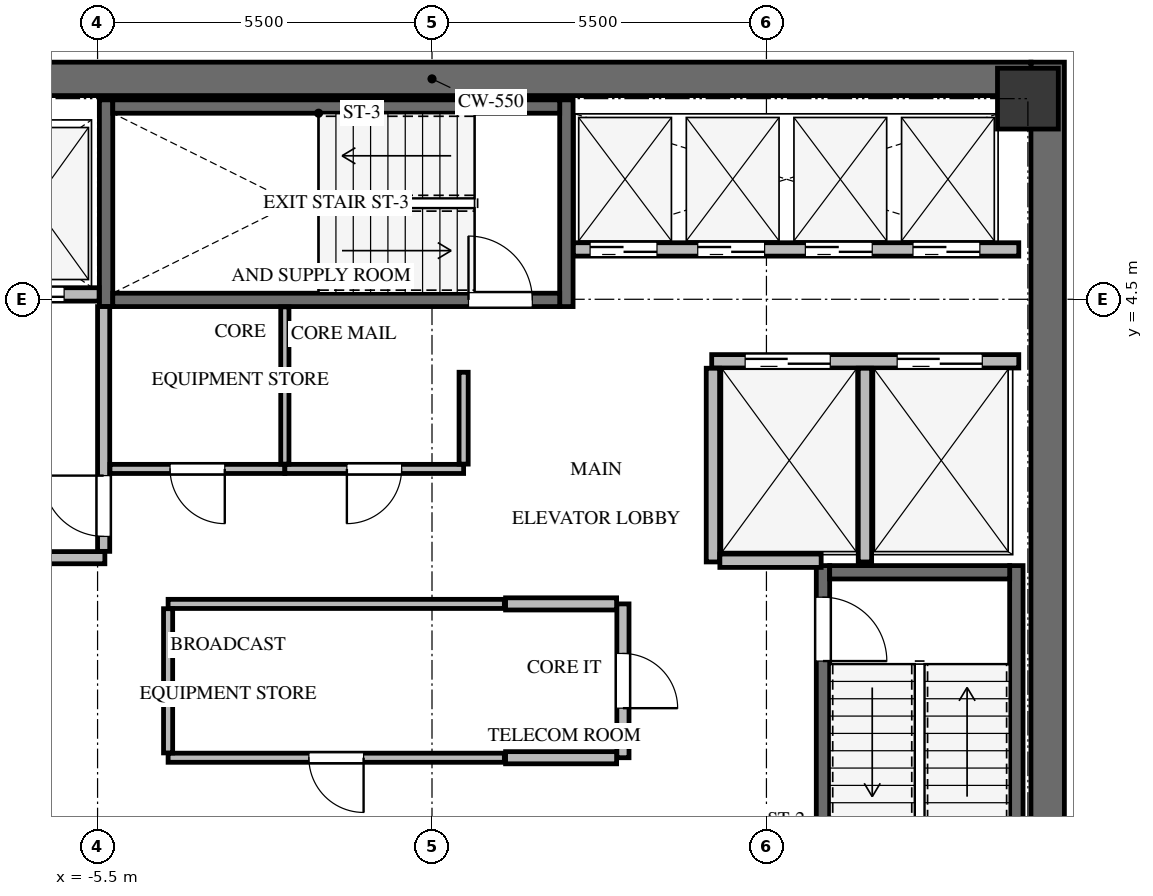
"""IFC4 building model, lengths in metres.
Left out: names, types, materials, properties, quantities, classifications, styles, units other than length and angle.
Written with IfcOpenShell. Run it as: python <this file> out.ifc"""

import sys

from ifc_helpers import new_model, si_unit, direction, frame, frame_2d, origin, origin_2d, place, context, subcontext, project, spatial, rectangle, extrude, source, transform, mapped, element, fill, save


model = new_model("IFC4")
c1 = context("Model", 3, precision=1e-05, world=origin(), true_north=direction((0.0, 1.0)))
c2 = subcontext(c1, "Body", "Model", "MODEL_VIEW")
j1 = project(units=[si_unit("LENGTHUNIT", "METRE"), si_unit("PLANEANGLEUNIT", "RADIAN")], contexts=[c1])
p1 = place(None, origin())
s1 = spatial("IfcSite", under=j1, at=p1, CompositionType="ELEMENT")
p2 = place(p1, origin())
s2 = spatial("IfcBuilding", under=s1, at=p2, CompositionType="ELEMENT")
p3 = place(p2, frame((0.0, 0.0, 228.2)))
s3 = spatial("IfcBuildingStorey", under=s2, at=p3, CompositionType="ELEMENT", Elevation=228.2)
p4 = place(p3, frame((10.125, -8.4, 0.0), z_axis=(0.0, 0.0, 1.0), x_axis=(0.0, 1.0, 0.0)))
e1 = element("IfcWall", 1, at=p4, inside=s3, PredefinedType="SHEAR", context=c2, shape_type="SweptSolid", body=[
    extrude(rectangle(XDim=16.8, YDim=0.55, at=frame_2d((8.4, 0.0))), origin(), (0.0, 0.0, 1.0), 3.3),
])
p5 = place(p3, frame((-9.85, 8.125, 0.0), z_axis=(0.0, 0.0, 1.0), x_axis=(1.0, 0.0, 0.0)))
e2 = element("IfcWall", 2, at=p5, inside=s3, PredefinedType="SHEAR", context=c2, shape_type="SweptSolid", body=[
    extrude(rectangle(XDim=19.7, YDim=0.55, at=frame_2d((9.85, 0.0))), origin(), (0.0, 0.0, 1.0), 3.3),
])
p6 = place(p3, frame((9.61, -7.77, -0.24), z_axis=(0.0, 0.0, 1.0), x_axis=(0.0, 1.0, 0.0)))
e3 = element("IfcWall", 3, at=p6, inside=s3, PredefinedType="SHEAR", context=c2, shape_type="SweptSolid", body=[
    extrude(rectangle(XDim=7.89, YDim=0.22, at=frame_2d((3.945, 0.0))), origin(), (0.0, 0.0, 1.0), 3.3),
])
p7 = place(p3, frame((6.43, 0.12, -0.24), z_axis=(0.0, 0.0, 1.0), x_axis=(0.0, -1.0, 0.0)))
e4 = element("IfcWall", 4, at=p7, inside=s3, PredefinedType="SHEAR", context=c2, shape_type="SweptSolid", body=[
    extrude(rectangle(XDim=7.89, YDim=0.22, at=frame_2d((3.945, 0.0))), origin(), (0.0, 0.0, 1.0), 3.3),
])
p8 = place(p7, frame((0.52, 0.0, 0.0)))
e5 = element("IfcOpeningElement", 5, at=p8, cuts=e4, PredefinedType="OPENING", context=c2, shape_type="SweptSolid", body=[
    extrude(rectangle(XDim=1.05, YDim=2.15, at=frame_2d((0.525, 1.075))), frame((0.0, 0.12, 0.0), z_axis=(0.0, -1.0, 0.0), x_axis=(1.0, 0.0, 0.0)), (0.0, 0.0, 1.0), 0.24),
])
p9 = place(p3, frame((9.5, 0.01, -0.24), z_axis=(0.0, 0.0, 1.0), x_axis=(-1.0, 0.0, 0.0)))
e6 = element("IfcWall", 6, at=p9, inside=s3, PredefinedType="SHEAR", context=c2, shape_type="SweptSolid", body=[
    extrude(rectangle(XDim=2.96, YDim=0.22, at=frame_2d((1.48, 0.0))), origin(), (0.0, 0.0, 1.0), 3.3),
])
for number, where, z_axis, x_axis in (
    (7, (2.21, 4.38, -0.24), (0.0, 0.0, 1.0), (0.0, 1.0, 0.0)),
    (8, (-5.36, 7.78, -0.24), (0.0, 0.0, 1.0), (0.0, -1.0, 0.0)),
):
    element("IfcWall", number, at=place(p3, frame(where, z_axis=z_axis, x_axis=x_axis)), inside=s3, PredefinedType="SHEAR", context=c2, shape_type="SweptSolid", body=[
        extrude(rectangle(XDim=3.4, YDim=0.22, at=frame_2d((1.7, 0.0))), origin(), (0.0, 0.0, 1.0), 3.3),
    ])
p10 = place(p3, frame((-5.25, 4.49, -0.24), z_axis=(0.0, 0.0, 1.0), x_axis=(1.0, 0.0, 0.0)))
e9 = element("IfcWall", 9, at=p10, inside=s3, PredefinedType="SHEAR", context=c2, shape_type="SweptSolid", body=[
    extrude(rectangle(XDim=7.35, YDim=0.22, at=frame_2d((3.675, 0.0))), origin(), (0.0, 0.0, 1.0), 3.3),
])
p11 = place(p10, frame((5.85, 0.0, 0.0)))
e10 = element("IfcOpeningElement", 10, at=p11, cuts=e9, PredefinedType="OPENING", context=c2, shape_type="SweptSolid", body=[
    extrude(rectangle(XDim=1.05, YDim=2.15, at=frame_2d((0.525, 1.075))), frame((0.0, 0.12, 0.0), z_axis=(0.0, -1.0, 0.0), x_axis=(1.0, 0.0, 0.0)), (0.0, 0.0, 1.0), 0.24),
])
p12 = place(p3, frame((2.1, 7.67, -0.24), z_axis=(0.0, 0.0, 1.0), x_axis=(-1.0, 0.0, 0.0)))
e11 = element("IfcWall", 11, at=p12, inside=s3, PredefinedType="SHEAR", context=c2, shape_type="SweptSolid", body=[
    extrude(rectangle(XDim=7.35, YDim=0.22, at=frame_2d((3.675, 0.0))), origin(), (0.0, 0.0, 1.0), 3.3),
])
m1 = source(origin(), c2, "Body", "SweptSolid", [
    extrude(rectangle(XDim=1.0, YDim=1.0, at=origin_2d()), origin(), (0.0, 0.0, 1.0), 3.3),
])
p13 = place(p3, frame((9.8, 7.8, -0.24), z_axis=(0.0, 0.0, 1.0), x_axis=(1.0, 0.0, 0.0)))
e12 = element("IfcColumn", 12, at=p13, inside=s3, PredefinedType="COLUMN", context=c2, shape_type="MappedRepresentation", body=[
    mapped(m1, transform((0.0, 0.0, 0.0), x_axis=(1.0, 0.0, 0.0), y_axis=(0.0, 1.0, 0.0), z_axis=(0.0, 0.0, 1.0), scale=1.0)),
])
p14 = place(p3, frame((-9.65, 4.58, 0.0), z_axis=(0.0, 0.0, 1.0), x_axis=(1.0, 0.0, 0.0)))
e13 = element("IfcWall", 13, at=p14, inside=s3, PredefinedType="SOLIDWALL", context=c2, shape_type="SweptSolid", body=[
    extrude(rectangle(XDim=4.175, YDim=0.22, at=frame_2d((2.087, 0.0))), origin(), (0.0, 0.0, 1.0), 3.045),
])
p15 = place(p14, frame((0.4, 0.0, 0.0)))
e14 = element("IfcOpeningElement", 14, at=p15, cuts=e13, PredefinedType="OPENING", context=c2, shape_type="SweptSolid", body=[
    extrude(rectangle(XDim=1.2, YDim=2.15, at=frame_2d((0.6, 1.075))), frame((0.0, 0.12, 0.0), z_axis=(0.0, -1.0, 0.0), x_axis=(1.0, 0.0, 0.0)), (0.0, 0.0, 1.0), 0.24),
])
p16 = place(p14, frame((2.4, 0.0, 0.0)))
e15 = element("IfcOpeningElement", 15, at=p16, cuts=e13, PredefinedType="OPENING", context=c2, shape_type="SweptSolid", body=[
    extrude(rectangle(XDim=1.2, YDim=2.15, at=frame_2d((0.6, 1.075))), frame((0.0, 0.12, 0.0), z_axis=(0.0, -1.0, 0.0), x_axis=(1.0, 0.0, 0.0)), (0.0, 0.0, 1.0), 0.24),
])
p17 = place(p3, frame((-9.65, 0.25, 0.0), z_axis=(0.0, 0.0, 1.0), x_axis=(1.0, 0.0, 0.0)))
e16 = element("IfcWall", 16, at=p17, inside=s3, PredefinedType="SOLIDWALL", context=c2, shape_type="SweptSolid", body=[
    extrude(rectangle(XDim=4.27, YDim=0.2, at=frame_2d((2.135, 0.0))), origin(), (0.0, 0.0, 1.0), 3.045),
])
p18 = place(p3, frame((-5.4, 0.354, 0.0), z_axis=(0.0, 0.0, 1.0), x_axis=(0.0, 1.0, 0.0)))
e17 = element("IfcWall", 17, at=p18, inside=s3, PredefinedType="SOLIDWALL", context=c2, shape_type="SweptSolid", body=[
    extrude(rectangle(XDim=4.026, YDim=0.2, at=frame_2d((2.013, 0.0))), origin(), (0.0, 0.0, 1.0), 3.045),
])
p19 = place(p18, frame((0.246, 0.0, 0.0)))
e18 = element("IfcOpeningElement", 18, at=p19, cuts=e17, PredefinedType="OPENING", context=c2, shape_type="SweptSolid", body=[
    extrude(rectangle(XDim=1.0, YDim=2.15, at=frame_2d((0.5, 1.075))), frame((0.0, 0.11, 0.0), z_axis=(0.0, -1.0, 0.0), x_axis=(1.0, 0.0, 0.0)), (0.0, 0.0, 1.0), 0.22),
])
p20 = place(p3, frame((4.6, 3.48, 0.0), z_axis=(0.0, 0.0, 1.0), x_axis=(1.0, 0.0, 0.0)))
e19 = element("IfcWall", 19, at=p20, inside=s3, PredefinedType="SOLIDWALL", context=c2, shape_type="SweptSolid", body=[
    extrude(rectangle(XDim=5.05, YDim=0.22, at=frame_2d((2.525, 0.0))), origin(), (0.0, 0.0, 1.0), 3.045),
])
p21 = place(p20, frame((0.55, 0.0, 0.0)))
e20 = element("IfcOpeningElement", 20, at=p21, cuts=e19, PredefinedType="OPENING", context=c2, shape_type="SweptSolid", body=[
    extrude(rectangle(XDim=1.4, YDim=2.15, at=frame_2d((0.7, 1.075))), frame((0.0, 0.12, 0.0), z_axis=(0.0, -1.0, 0.0), x_axis=(1.0, 0.0, 0.0)), (0.0, 0.0, 1.0), 0.24),
])
p22 = place(p20, frame((3.05, 0.0, 0.0)))
e21 = element("IfcOpeningElement", 21, at=p22, cuts=e19, PredefinedType="OPENING", context=c2, shape_type="SweptSolid", body=[
    extrude(rectangle(XDim=1.4, YDim=2.15, at=frame_2d((0.7, 1.075))), frame((0.0, 0.12, 0.0), z_axis=(0.0, -1.0, 0.0), x_axis=(1.0, 0.0, 0.0)), (0.0, 0.0, 1.0), 0.24),
])
for number, where, z_axis, x_axis in (
    (22, (4.62, 0.18, 0.0), (0.0, 0.0, 1.0), (0.0, 1.0, 0.0)),
    (23, (7.12, 0.18, 0.0), (0.0, 0.0, 1.0), (0.0, 1.0, 0.0)),
):
    element("IfcWall", number, at=place(p3, frame(where, z_axis=z_axis, x_axis=x_axis)), inside=s3, PredefinedType="SOLIDWALL", context=c2, shape_type="SweptSolid", body=[
        extrude(rectangle(XDim=3.186, YDim=0.22, at=frame_2d((1.593, 0.0))), origin(), (0.0, 0.0, 1.0), 3.045),
    ])
p23 = place(p3, frame((4.734, 0.2, 0.0), z_axis=(0.0, 0.0, 1.0), x_axis=(1.0, 0.0, 0.0)))
e24 = element("IfcWall", 24, at=p23, inside=s3, PredefinedType="SOLIDWALL", context=c2, shape_type="SweptSolid", body=[
    extrude(rectangle(XDim=1.666, YDim=0.22, at=frame_2d((0.833, 0.0))), origin(), (0.0, 0.0, 1.0), 3.045),
])
p24 = place(p3, frame((2.325, 5.32, 0.0), z_axis=(0.0, 0.0, 1.0), x_axis=(1.0, 0.0, 0.0)))
e25 = element("IfcWall", 25, at=p24, inside=s3, PredefinedType="SOLIDWALL", context=c2, shape_type="SweptSolid", body=[
    extrude(rectangle(XDim=7.325, YDim=0.22, at=frame_2d((3.663, 0.0))), origin(), (0.0, 0.0, 1.0), 3.045),
])
p25 = place(p24, frame((0.275, 0.0, 0.0)))
e26 = element("IfcOpeningElement", 26, at=p25, cuts=e25, PredefinedType="OPENING", context=c2, shape_type="SweptSolid", body=[
    extrude(rectangle(XDim=1.1, YDim=2.15, at=frame_2d((0.55, 1.075))), frame((0.0, 0.12, 0.0), z_axis=(0.0, -1.0, 0.0), x_axis=(1.0, 0.0, 0.0)), (0.0, 0.0, 1.0), 0.24),
])
p26 = place(p24, frame((2.045, 0.0, 0.0)))
e27 = element("IfcOpeningElement", 27, at=p26, cuts=e25, PredefinedType="OPENING", context=c2, shape_type="SweptSolid", body=[
    extrude(rectangle(XDim=1.1, YDim=2.15, at=frame_2d((0.55, 1.075))), frame((0.0, 0.12, 0.0), z_axis=(0.0, -1.0, 0.0), x_axis=(1.0, 0.0, 0.0)), (0.0, 0.0, 1.0), 0.24),
])
p27 = place(p24, frame((3.815, 0.0, 0.0)))
e28 = element("IfcOpeningElement", 28, at=p27, cuts=e25, PredefinedType="OPENING", context=c2, shape_type="SweptSolid", body=[
    extrude(rectangle(XDim=1.1, YDim=2.15, at=frame_2d((0.55, 1.075))), frame((0.0, 0.12, 0.0), z_axis=(0.0, -1.0, 0.0), x_axis=(1.0, 0.0, 0.0)), (0.0, 0.0, 1.0), 0.24),
])
p28 = place(p24, frame((5.585, 0.0, 0.0)))
e29 = element("IfcOpeningElement", 29, at=p28, cuts=e25, PredefinedType="OPENING", context=c2, shape_type="SweptSolid", body=[
    extrude(rectangle(XDim=1.1, YDim=2.15, at=frame_2d((0.55, 1.075))), frame((0.0, 0.12, 0.0), z_axis=(0.0, -1.0, 0.0), x_axis=(1.0, 0.0, 0.0)), (0.0, 0.0, 1.0), 0.24),
])
p29 = place(p3, frame((1.19, -3.04, 0.0), z_axis=(0.0, 0.0, 1.0), x_axis=(-1.0, 0.0, 0.0)))
e30 = element("IfcWall", 30, at=p29, inside=s3, PredefinedType="PARTITIONING", context=c2, shape_type="SweptSolid", body=[
    extrude(rectangle(XDim=5.53, YDim=0.15, at=frame_2d((2.765, 0.0))), origin(), (0.0, 0.0, 1.0), 3.045),
])
p30 = place(p29, frame((2.315, 0.0, 0.0)))
e31 = element("IfcOpeningElement", 31, at=p30, cuts=e30, PredefinedType="OPENING", context=c2, shape_type="SweptSolid", body=[
    extrude(rectangle(XDim=0.9, YDim=2.05, at=frame_2d((0.45, 1.025))), frame((0.0, 0.085, 0.0), z_axis=(0.0, -1.0, 0.0), x_axis=(1.0, 0.0, 0.0)), (0.0, 0.0, 1.0), 0.17),
])
p31 = place(p3, frame((-4.34, -0.51, 0.0), z_axis=(0.0, 0.0, 1.0), x_axis=(1.0, 0.0, 0.0)))
e32 = element("IfcWall", 32, at=p31, inside=s3, PredefinedType="PARTITIONING", context=c2, shape_type="SweptSolid", body=[
    extrude(rectangle(XDim=5.53, YDim=0.15, at=frame_2d((2.765, 0.0))), origin(), (0.0, 0.0, 1.0), 3.045),
])
p32 = place(p3, frame((-4.34, -2.961, 0.0), z_axis=(0.0, 0.0, 1.0), x_axis=(0.0, 1.0, 0.0)))
e33 = element("IfcWall", 33, at=p32, inside=s3, PredefinedType="PARTITIONING", context=c2, shape_type="SweptSolid", body=[
    extrude(rectangle(XDim=2.372, YDim=0.15, at=frame_2d((1.186, 0.0))), origin(), (0.0, 0.0, 1.0), 3.045),
])
p33 = place(p3, frame((3.14, -0.51, 0.0), z_axis=(0.0, 0.0, 1.0), x_axis=(0.0, -1.0, 0.0)))
e34 = element("IfcWall", 34, at=p33, inside=s3, PredefinedType="SOLIDWALL", context=c2, shape_type="SweptSolid", body=[
    extrude(rectangle(XDim=2.53, YDim=0.2, at=frame_2d((1.265, 0.0))), origin(), (0.0, 0.0, 1.0), 3.045),
])
p34 = place(p33, frame((0.815, 0.0, 0.0)))
e35 = element("IfcOpeningElement", 35, at=p34, cuts=e34, PredefinedType="OPENING", context=c2, shape_type="SweptSolid", body=[
    extrude(rectangle(XDim=0.9, YDim=2.05, at=frame_2d((0.45, 1.025))), frame((0.0, 0.11, 0.0), z_axis=(0.0, -1.0, 0.0), x_axis=(1.0, 0.0, 0.0)), (0.0, 0.0, 1.0), 0.22),
])
for number, where, z_axis, x_axis in (
    (36, (3.036, -3.04, 0.0), (0.0, 0.0, 1.0), (-1.0, 0.0, 0.0)),
    (37, (1.21, -0.51, 0.0), (0.0, 0.0, 1.0), (1.0, 0.0, 0.0)),
):
    element("IfcWall", number, at=place(p3, frame(where, z_axis=z_axis, x_axis=x_axis)), inside=s3, PredefinedType="SOLIDWALL", context=c2, shape_type="SweptSolid", body=[
        extrude(rectangle(XDim=1.826, YDim=0.2, at=frame_2d((0.913, 0.0))), origin(), (0.0, 0.0, 1.0), 3.045),
    ])
p35 = place(p3, frame((-2.42, 1.71, 0.0), z_axis=(0.0, 0.0, 1.0), x_axis=(-1.0, 0.0, 0.0)))
e38 = element("IfcWall", 38, at=p35, inside=s3, PredefinedType="PARTITIONING", context=c2, shape_type="SweptSolid", body=[
    extrude(rectangle(XDim=2.876, YDim=0.15, at=frame_2d((1.438, 0.0))), origin(), (0.0, 0.0, 1.0), 3.045),
])
p36 = place(p35, frame((0.988, 0.0, 0.0)))
e39 = element("IfcOpeningElement", 39, at=p36, cuts=e38, PredefinedType="OPENING", context=c2, shape_type="SweptSolid", body=[
    extrude(rectangle(XDim=0.9, YDim=2.05, at=frame_2d((0.45, 1.025))), frame((0.0, 0.085, 0.0), z_axis=(0.0, -1.0, 0.0), x_axis=(1.0, 0.0, 0.0)), (0.0, 0.0, 1.0), 0.17),
])
p37 = place(p3, frame((0.52, 1.71, 0.0), z_axis=(0.0, 0.0, 1.0), x_axis=(-1.0, 0.0, 0.0)))
e40 = element("IfcWall", 40, at=p37, inside=s3, PredefinedType="PARTITIONING", context=c2, shape_type="SweptSolid", body=[
    extrude(rectangle(XDim=2.94, YDim=0.15, at=frame_2d((1.47, 0.0))), origin(), (0.0, 0.0, 1.0), 3.045),
])
p38 = place(p37, frame((1.02, 0.0, 0.0)))
e41 = element("IfcOpeningElement", 41, at=p38, cuts=e40, PredefinedType="OPENING", context=c2, shape_type="SweptSolid", body=[
    extrude(rectangle(XDim=0.9, YDim=2.05, at=frame_2d((0.45, 1.025))), frame((0.0, 0.085, 0.0), z_axis=(0.0, -1.0, 0.0), x_axis=(1.0, 0.0, 0.0)), (0.0, 0.0, 1.0), 0.17),
])
p39 = place(p3, frame((0.52, 3.3, 0.0), z_axis=(0.0, 0.0, 1.0), x_axis=(0.0, -1.0, 0.0)))
e42 = element("IfcWall", 42, at=p39, inside=s3, PredefinedType="PARTITIONING", context=c2, shape_type="SweptSolid", body=[
    extrude(rectangle(XDim=1.511, YDim=0.15, at=frame_2d((0.755, 0.0))), origin(), (0.0, 0.0, 1.0), 3.045),
])
p40 = place(p3, frame((-2.42, 4.375, 0.0), z_axis=(0.0, 0.0, 1.0), x_axis=(0.0, -1.0, 0.0)))
e43 = element("IfcWall", 43, at=p40, inside=s3, PredefinedType="PARTITIONING", context=c2, shape_type="SweptSolid", body=[
    extrude(rectangle(XDim=2.586, YDim=0.135, at=frame_2d((1.293, 0.0))), origin(), (0.0, 0.0, 1.0), 3.045),
])
m2 = source(origin(), c2, "Body", "SweptSolid", [
    extrude(rectangle(XDim=1.05, YDim=2.15, at=frame_2d((0.525, 1.075))), frame((0.0, 0.025, 0.0), z_axis=(0.0, -1.0, 0.0), x_axis=(1.0, 0.0, 0.0)), (0.0, 0.0, 1.0), 0.05),
])
p41 = place(p8, origin())
e44 = element("IfcDoor", 44, at=p41, inside=s3, OperationType="SINGLE_SWING_RIGHT", PredefinedType="DOOR", context=c2, shape_type="MappedRepresentation", body=[
    mapped(m2, transform((0.0, 0.0, 0.0), x_axis=(1.0, 0.0, 0.0), y_axis=(0.0, 1.0, 0.0), z_axis=(0.0, 0.0, 1.0), scale=1.0)),
])
fill(e5, e44)
m3 = source(origin(), c2, "Body", "SweptSolid", [
    extrude(rectangle(XDim=1.05, YDim=2.15, at=frame_2d((0.525, 1.075))), frame((0.0, 0.025, 0.0), z_axis=(0.0, -1.0, 0.0), x_axis=(1.0, 0.0, 0.0)), (0.0, 0.0, 1.0), 0.05),
])
p42 = place(p11, origin())
e45 = element("IfcDoor", 45, at=p42, inside=s3, OperationType="SINGLE_SWING_LEFT", PredefinedType="DOOR", context=c2, shape_type="MappedRepresentation", body=[
    mapped(m3, transform((0.0, 0.0, 0.0), x_axis=(1.0, 0.0, 0.0), y_axis=(0.0, 1.0, 0.0), z_axis=(0.0, 0.0, 1.0), scale=1.0)),
])
fill(e10, e45)
m4 = source(origin(), c2, "Body", "SweptSolid", [
    extrude(rectangle(XDim=1.2, YDim=2.15, at=frame_2d((0.6, 1.075))), frame((0.0, 0.025, 0.0), z_axis=(0.0, -1.0, 0.0), x_axis=(1.0, 0.0, 0.0)), (0.0, 0.0, 1.0), 0.05),
])
p43 = place(p16, origin())
e46 = element("IfcDoor", 46, at=p43, inside=s3, OperationType="DOUBLE_DOOR_SLIDING", PredefinedType="DOOR", context=c2, shape_type="MappedRepresentation", body=[
    mapped(m4, transform((0.0, 0.0, 0.0), x_axis=(1.0, 0.0, 0.0), y_axis=(0.0, 1.0, 0.0), z_axis=(0.0, 0.0, 1.0), scale=1.0)),
])
fill(e15, e46)
m5 = source(origin(), c2, "Body", "SweptSolid", [
    extrude(rectangle(XDim=1.0, YDim=2.15, at=frame_2d((0.5, 1.075))), frame((0.0, 0.025, 0.0), z_axis=(0.0, -1.0, 0.0), x_axis=(1.0, 0.0, 0.0)), (0.0, 0.0, 1.0), 0.05),
])
p44 = place(p19, origin())
e47 = element("IfcDoor", 47, at=p44, inside=s3, OperationType="SINGLE_SWING_RIGHT", PredefinedType="DOOR", context=c2, shape_type="MappedRepresentation", body=[
    mapped(m5, transform((0.0, 0.0, 0.0), x_axis=(1.0, 0.0, 0.0), y_axis=(0.0, 1.0, 0.0), z_axis=(0.0, 0.0, 1.0), scale=1.0)),
])
fill(e18, e47)
m6 = source(origin(), c2, "Body", "SweptSolid", [
    extrude(rectangle(XDim=1.4, YDim=2.15, at=frame_2d((0.7, 1.075))), frame((0.0, 0.025, 0.0), z_axis=(0.0, -1.0, 0.0), x_axis=(1.0, 0.0, 0.0)), (0.0, 0.0, 1.0), 0.05),
])
p45 = place(p21, origin())
e48 = element("IfcDoor", 48, at=p45, inside=s3, OperationType="DOUBLE_DOOR_SLIDING", PredefinedType="DOOR", context=c2, shape_type="MappedRepresentation", body=[
    mapped(m6, transform((0.0, 0.0, 0.0), x_axis=(1.0, 0.0, 0.0), y_axis=(0.0, 1.0, 0.0), z_axis=(0.0, 0.0, 1.0), scale=1.0)),
])
fill(e20, e48)
p46 = place(p22, origin())
e49 = element("IfcDoor", 49, at=p46, inside=s3, OperationType="DOUBLE_DOOR_SLIDING", PredefinedType="DOOR", context=c2, shape_type="MappedRepresentation", body=[
    mapped(m6, transform((0.0, 0.0, 0.0), x_axis=(1.0, 0.0, 0.0), y_axis=(0.0, 1.0, 0.0), z_axis=(0.0, 0.0, 1.0), scale=1.0)),
])
fill(e21, e49)
m7 = source(origin(), c2, "Body", "SweptSolid", [
    extrude(rectangle(XDim=1.1, YDim=2.15, at=frame_2d((0.55, 1.075))), frame((0.0, 0.025, 0.0), z_axis=(0.0, -1.0, 0.0), x_axis=(1.0, 0.0, 0.0)), (0.0, 0.0, 1.0), 0.05),
])
p47 = place(p25, origin())
e50 = element("IfcDoor", 50, at=p47, inside=s3, OperationType="DOUBLE_DOOR_SLIDING", PredefinedType="DOOR", context=c2, shape_type="MappedRepresentation", body=[
    mapped(m7, transform((0.0, 0.0, 0.0), x_axis=(1.0, 0.0, 0.0), y_axis=(0.0, 1.0, 0.0), z_axis=(0.0, 0.0, 1.0), scale=1.0)),
])
fill(e26, e50)
p48 = place(p26, origin())
e51 = element("IfcDoor", 51, at=p48, inside=s3, OperationType="DOUBLE_DOOR_SLIDING", PredefinedType="DOOR", context=c2, shape_type="MappedRepresentation", body=[
    mapped(m7, transform((0.0, 0.0, 0.0), x_axis=(1.0, 0.0, 0.0), y_axis=(0.0, 1.0, 0.0), z_axis=(0.0, 0.0, 1.0), scale=1.0)),
])
fill(e27, e51)
p49 = place(p27, origin())
e52 = element("IfcDoor", 52, at=p49, inside=s3, OperationType="DOUBLE_DOOR_SLIDING", PredefinedType="DOOR", context=c2, shape_type="MappedRepresentation", body=[
    mapped(m7, transform((0.0, 0.0, 0.0), x_axis=(1.0, 0.0, 0.0), y_axis=(0.0, 1.0, 0.0), z_axis=(0.0, 0.0, 1.0), scale=1.0)),
])
fill(e28, e52)
p50 = place(p28, origin())
e53 = element("IfcDoor", 53, at=p50, inside=s3, OperationType="DOUBLE_DOOR_SLIDING", PredefinedType="DOOR", context=c2, shape_type="MappedRepresentation", body=[
    mapped(m7, transform((0.0, 0.0, 0.0), x_axis=(1.0, 0.0, 0.0), y_axis=(0.0, 1.0, 0.0), z_axis=(0.0, 0.0, 1.0), scale=1.0)),
])
fill(e29, e53)
m8 = source(origin(), c2, "Body", "SweptSolid", [
    extrude(rectangle(XDim=0.9, YDim=2.05, at=frame_2d((0.45, 1.025))), frame((0.0, 0.025, 0.0), z_axis=(0.0, -1.0, 0.0), x_axis=(1.0, 0.0, 0.0)), (0.0, 0.0, 1.0), 0.05),
])
p51 = place(p30, origin())
e54 = element("IfcDoor", 54, at=p51, inside=s3, OperationType="SINGLE_SWING_LEFT", PredefinedType="DOOR", context=c2, shape_type="MappedRepresentation", body=[
    mapped(m8, transform((0.0, 0.0, 0.0), x_axis=(1.0, 0.0, 0.0), y_axis=(0.0, 1.0, 0.0), z_axis=(0.0, 0.0, 1.0), scale=1.0)),
])
fill(e31, e54)
m9 = source(origin(), c2, "Body", "SweptSolid", [
    extrude(rectangle(XDim=0.9, YDim=2.05, at=frame_2d((0.45, 1.025))), frame((0.0, 0.025, 0.0), z_axis=(0.0, -1.0, 0.0), x_axis=(1.0, 0.0, 0.0)), (0.0, 0.0, 1.0), 0.05),
])
p52 = place(p34, origin())
e55 = element("IfcDoor", 55, at=p52, inside=s3, OperationType="SINGLE_SWING_RIGHT", PredefinedType="DOOR", context=c2, shape_type="MappedRepresentation", body=[
    mapped(m9, transform((0.0, 0.0, 0.0), x_axis=(1.0, 0.0, 0.0), y_axis=(0.0, 1.0, 0.0), z_axis=(0.0, 0.0, 1.0), scale=1.0)),
])
fill(e35, e55)
p53 = place(p36, origin())
e56 = element("IfcDoor", 56, at=p53, inside=s3, OperationType="SINGLE_SWING_LEFT", PredefinedType="DOOR", context=c2, shape_type="MappedRepresentation", body=[
    mapped(m8, transform((0.0, 0.0, 0.0), x_axis=(1.0, 0.0, 0.0), y_axis=(0.0, 1.0, 0.0), z_axis=(0.0, 0.0, 1.0), scale=1.0)),
])
fill(e39, e56)
p54 = place(p38, origin())
e57 = element("IfcDoor", 57, at=p54, inside=s3, OperationType="SINGLE_SWING_RIGHT", PredefinedType="DOOR", context=c2, shape_type="MappedRepresentation", body=[
    mapped(m9, transform((0.0, 0.0, 0.0), x_axis=(1.0, 0.0, 0.0), y_axis=(0.0, 1.0, 0.0), z_axis=(0.0, 0.0, 1.0), scale=1.0)),
])
fill(e41, e57)
save(model, sys.argv[1])
